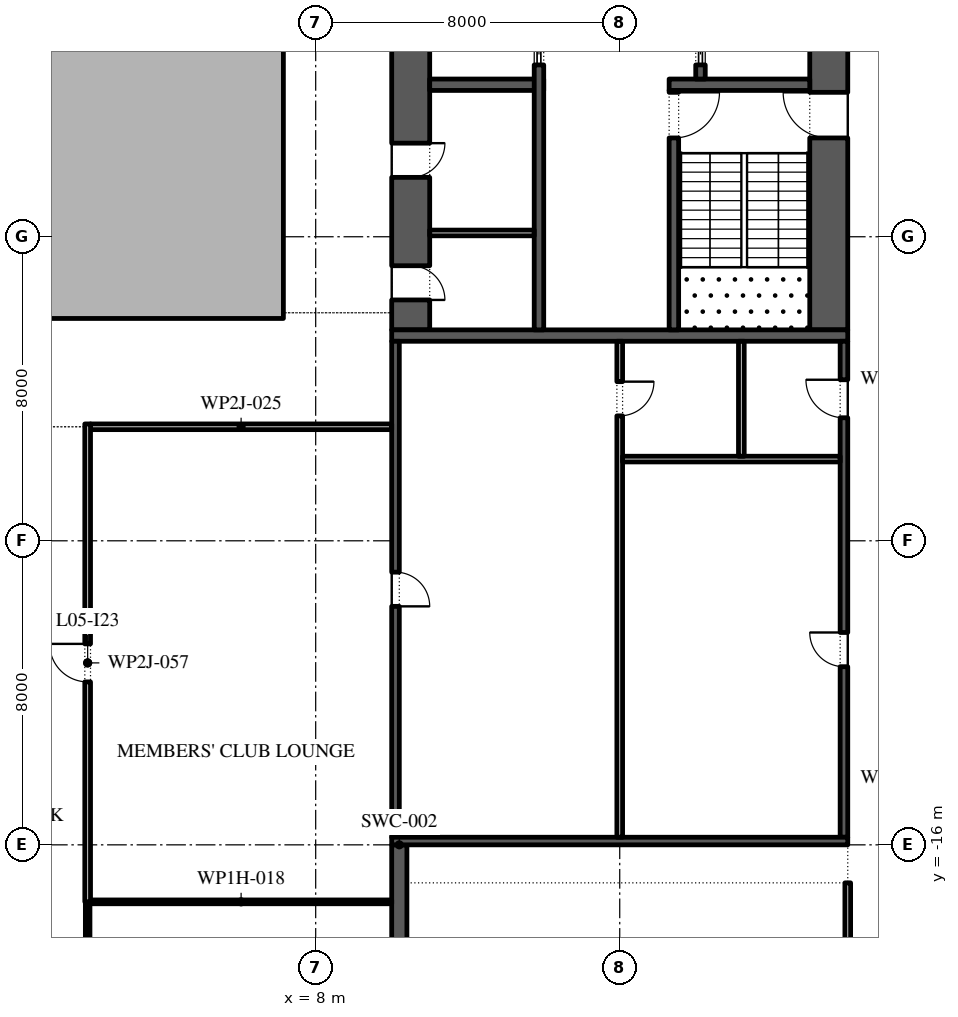
"""IFC4 building model, lengths in metres.
Left out: names, types, materials, properties, quantities, classifications, styles, units other than length and angle.
Written with IfcOpenShell. Run it as: python <this file> out.ifc"""

import sys

from ifc_helpers import new_model, si_unit, direction, frame, frame_2d, origin, place, context, subcontext, project, spatial, polyline, rectangle, outline, extrude, element, fill, save


model = new_model("IFC4")
c1 = context("Model", 3, precision=1e-05, world=origin(), true_north=direction((0.0, 1.0)))
c2 = subcontext(c1, "Body", "Model", "MODEL_VIEW")
j1 = project(units=[si_unit("LENGTHUNIT", "METRE"), si_unit("PLANEANGLEUNIT", "RADIAN")], contexts=[c1])
p1 = place(None, origin())
s1 = spatial("IfcSite", under=j1, at=p1, CompositionType="ELEMENT")
p2 = place(p1, origin())
s2 = spatial("IfcBuilding", under=s1, at=p2, CompositionType="ELEMENT")
p3 = place(p2, frame((0.0, 0.0, 28.8)))
s3 = spatial("IfcBuildingStorey", under=s2, at=p3, CompositionType="ELEMENT", Elevation=28.8)
p4 = place(p3, frame((10.2, -31.0, 0.0), z_axis=(0.0, 0.0, 1.0), x_axis=(0.0, 1.0, 0.0)))
e1 = element("IfcWall", 1, at=p4, inside=s3, PredefinedType="SHEAR", context=c2, shape_type="SweptSolid", body=[
    extrude(rectangle(XDim=15.0, YDim=0.4, at=frame_2d((7.5, 0.0))), origin(), (0.0, 0.0, 1.0), 4.35),
])
p5 = place(p3, origin())
e2 = element("IfcWall", 2, at=p5, inside=s3, PredefinedType="STANDARD", context=c2, shape_type="SweptSolid", body=[
    extrude(outline(polyline([(-7.15, -2.15), (7.15, -2.15), (7.15, 16.15), (-7.15, 16.15), (-7.15, -2.15)]), holes=[polyline([(-7.0, -2.0), (-7.0, 16.0), (7.0, 16.0), (7.0, -2.0), (-7.0, -2.0)])]), origin(), (0.0, 0.0, 1.0), 4.35),
])
p6 = place(p3, frame((21.5, -2.45, 0.0), z_axis=(0.0, 0.0, 1.0), x_axis=(0.0, 1.0, 0.0)))
e3 = element("IfcWall", 3, at=p6, inside=s3, PredefinedType="SHEAR", context=c2, shape_type="SweptSolid", body=[
    extrude(rectangle(XDim=27.9, YDim=1.0, at=frame_2d((13.95, 0.0))), origin(), (0.0, 0.0, 1.0), 4.35),
])
p7 = place(p6, frame((5.05, 0.0, 0.0)))
e4 = element("IfcOpeningElement", 4, at=p7, cuts=e3, PredefinedType="OPENING", context=c2, shape_type="SweptSolid", body=[
    extrude(rectangle(XDim=1.2, YDim=2.1, at=frame_2d((0.6, 1.05))), frame((0.0, 0.51, 0.0), z_axis=(0.0, -1.0, 0.0), x_axis=(1.0, 0.0, 0.0)), (0.0, 0.0, 1.0), 1.02),
])
p8 = place(p6, frame((21.65, 0.0, 0.0)))
e5 = element("IfcOpeningElement", 5, at=p8, cuts=e3, PredefinedType="OPENING", context=c2, shape_type="SweptSolid", body=[
    extrude(rectangle(XDim=1.2, YDim=2.1, at=frame_2d((0.6, 1.05))), frame((0.0, 0.51, 0.0), z_axis=(0.0, -1.0, 0.0), x_axis=(1.0, 0.0, 0.0)), (0.0, 0.0, 1.0), 1.02),
])
p9 = place(p3, frame((10.5, -2.45, 0.0), z_axis=(0.0, 0.0, 1.0), x_axis=(0.0, 1.0, 0.0)))
e6 = element("IfcWall", 6, at=p9, inside=s3, PredefinedType="SHEAR", context=c2, shape_type="SweptSolid", body=[
    extrude(rectangle(XDim=27.9, YDim=1.0, at=frame_2d((13.95, 0.0))), origin(), (0.0, 0.0, 1.0), 4.35),
])
p10 = place(p9, frame((23.65, 0.0, 0.0)))
e7 = element("IfcOpeningElement", 7, at=p10, cuts=e6, PredefinedType="OPENING", context=c2, shape_type="SweptSolid", body=[
    extrude(rectangle(XDim=2.4, YDim=2.1, at=frame_2d((1.2, 1.05))), frame((0.0, 0.51, 0.0), z_axis=(0.0, -1.0, 0.0), x_axis=(1.0, 0.0, 0.0)), (0.0, 0.0, 1.0), 1.02),
])
p11 = place(p9, frame((0.788, 0.0, 0.0)))
e8 = element("IfcOpeningElement", 8, at=p11, cuts=e6, PredefinedType="OPENING", context=c2, shape_type="SweptSolid", body=[
    extrude(rectangle(XDim=0.9, YDim=2.1, at=frame_2d((0.45, 1.05))), frame((0.0, 0.51, 0.0), z_axis=(0.0, -1.0, 0.0), x_axis=(1.0, 0.0, 0.0)), (0.0, 0.0, 1.0), 1.02),
])
p12 = place(p9, frame((4.012, 0.0, 0.0)))
e9 = element("IfcOpeningElement", 9, at=p12, cuts=e6, PredefinedType="OPENING", context=c2, shape_type="SweptSolid", body=[
    extrude(rectangle(XDim=0.9, YDim=2.1, at=frame_2d((0.45, 1.05))), frame((0.0, 0.51, 0.0), z_axis=(0.0, -1.0, 0.0), x_axis=(1.0, 0.0, 0.0)), (0.0, 0.0, 1.0), 1.02),
])
p13 = place(p3, frame((10.0, -2.6, 0.0), z_axis=(0.0, 0.0, 1.0), x_axis=(1.0, 0.0, 0.0)))
e10 = element("IfcWall", 10, at=p13, inside=s3, PredefinedType="SHEAR", context=c2, shape_type="SweptSolid", body=[
    extrude(rectangle(XDim=12.0, YDim=0.3, at=frame_2d((6.0, 0.0))), origin(), (0.0, 0.0, 1.0), 4.35),
])
p14 = place(p3, frame((17.3, 4.0, 0.0), z_axis=(0.0, 0.0, 1.0), x_axis=(1.0, 0.0, 0.0)))
e11 = element("IfcWall", 11, at=p14, inside=s3, PredefinedType="SHEAR", context=c2, shape_type="SweptSolid", body=[
    extrude(rectangle(XDim=3.7, YDim=0.3, at=frame_2d((1.85, 0.0))), origin(), (0.0, 0.0, 1.0), 4.35),
])
p15 = place(p3, frame((17.425, -2.45, 0.0), z_axis=(0.0, 0.0, 1.0), x_axis=(0.0, 1.0, 0.0)))
e12 = element("IfcWall", 12, at=p15, inside=s3, PredefinedType="SHEAR", context=c2, shape_type="SweptSolid", body=[
    extrude(rectangle(XDim=6.3, YDim=0.25, at=frame_2d((3.15, 0.0))), origin(), (0.0, 0.0, 1.0), 4.35),
])
p16 = place(p15, frame((5.05, 0.0, 0.0)))
e13 = element("IfcOpeningElement", 13, at=p16, cuts=e12, PredefinedType="OPENING", context=c2, shape_type="SweptSolid", body=[
    extrude(rectangle(XDim=1.2, YDim=2.1, at=frame_2d((0.6, 1.05))), frame((0.0, 0.135, 0.0), z_axis=(0.0, -1.0, 0.0), x_axis=(1.0, 0.0, 0.0)), (0.0, 0.0, 1.0), 0.27),
])
p17 = place(p3, frame((18.125, 4.15, 0.0), z_axis=(0.0, 0.0, 1.0), x_axis=(0.0, 1.0, 0.0)))
e14 = element("IfcWall", 14, at=p17, inside=s3, PredefinedType="SHEAR", context=c2, shape_type="SweptSolid", body=[
    extrude(rectangle(XDim=14.7, YDim=0.25, at=frame_2d((7.35, 0.0))), origin(), (0.0, 0.0, 1.0), 4.35),
])
p18 = place(p17, frame((0.371, 0.0, 0.0)))
e15 = element("IfcOpeningElement", 15, at=p18, cuts=e14, PredefinedType="OPENING", context=c2, shape_type="SweptSolid", body=[
    extrude(rectangle(XDim=1.1, YDim=2.1, at=frame_2d((0.55, 1.05))), frame((0.0, 0.135, 0.0), z_axis=(0.0, -1.0, 0.0), x_axis=(1.0, 0.0, 0.0)), (0.0, 0.0, 1.0), 0.27),
])
p19 = place(p17, frame((2.514, 0.0, 0.0)))
e16 = element("IfcOpeningElement", 16, at=p19, cuts=e14, PredefinedType="OPENING", context=c2, shape_type="SweptSolid", body=[
    extrude(rectangle(XDim=1.1, YDim=2.1, at=frame_2d((0.55, 1.05))), frame((0.0, 0.135, 0.0), z_axis=(0.0, -1.0, 0.0), x_axis=(1.0, 0.0, 0.0)), (0.0, 0.0, 1.0), 0.27),
])
p20 = place(p17, frame((4.657, 0.0, 0.0)))
e17 = element("IfcOpeningElement", 17, at=p20, cuts=e14, PredefinedType="OPENING", context=c2, shape_type="SweptSolid", body=[
    extrude(rectangle(XDim=1.1, YDim=2.1, at=frame_2d((0.55, 1.05))), frame((0.0, 0.135, 0.0), z_axis=(0.0, -1.0, 0.0), x_axis=(1.0, 0.0, 0.0)), (0.0, 0.0, 1.0), 0.27),
])
p21 = place(p17, frame((6.8, 0.0, 0.0)))
e18 = element("IfcOpeningElement", 18, at=p21, cuts=e14, PredefinedType="OPENING", context=c2, shape_type="SweptSolid", body=[
    extrude(rectangle(XDim=1.1, YDim=2.1, at=frame_2d((0.55, 1.05))), frame((0.0, 0.135, 0.0), z_axis=(0.0, -1.0, 0.0), x_axis=(1.0, 0.0, 0.0)), (0.0, 0.0, 1.0), 0.27),
])
p22 = place(p17, frame((8.943, 0.0, 0.0)))
e19 = element("IfcOpeningElement", 19, at=p22, cuts=e14, PredefinedType="OPENING", context=c2, shape_type="SweptSolid", body=[
    extrude(rectangle(XDim=1.1, YDim=2.1, at=frame_2d((0.55, 1.05))), frame((0.0, 0.135, 0.0), z_axis=(0.0, -1.0, 0.0), x_axis=(1.0, 0.0, 0.0)), (0.0, 0.0, 1.0), 0.27),
])
p23 = place(p17, frame((11.086, 0.0, 0.0)))
e20 = element("IfcOpeningElement", 20, at=p23, cuts=e14, PredefinedType="OPENING", context=c2, shape_type="SweptSolid", body=[
    extrude(rectangle(XDim=1.1, YDim=2.1, at=frame_2d((0.55, 1.05))), frame((0.0, 0.135, 0.0), z_axis=(0.0, -1.0, 0.0), x_axis=(1.0, 0.0, 0.0)), (0.0, 0.0, 1.0), 0.27),
])
p24 = place(p17, frame((13.229, 0.0, 0.0)))
e21 = element("IfcOpeningElement", 21, at=p24, cuts=e14, PredefinedType="OPENING", context=c2, shape_type="SweptSolid", body=[
    extrude(rectangle(XDim=1.1, YDim=2.1, at=frame_2d((0.55, 1.05))), frame((0.0, 0.135, 0.0), z_axis=(0.0, -1.0, 0.0), x_axis=(1.0, 0.0, 0.0)), (0.0, 0.0, 1.0), 0.27),
])
p25 = place(p3, frame((11.0, 4.0, 0.0), z_axis=(0.0, 0.0, 1.0), x_axis=(1.0, 0.0, 0.0)))
e22 = element("IfcWall", 22, at=p25, inside=s3, PredefinedType="SHEAR", context=c2, shape_type="SweptSolid", body=[
    extrude(rectangle(XDim=3.0, YDim=0.3, at=frame_2d((1.5, 0.0))), origin(), (0.0, 0.0, 1.0), 4.35),
])
p26 = place(p3, frame((13.875, -2.45, 0.0), z_axis=(0.0, 0.0, 1.0), x_axis=(0.0, 1.0, 0.0)))
e23 = element("IfcWall", 23, at=p26, inside=s3, PredefinedType="SHEAR", context=c2, shape_type="SweptSolid", body=[
    extrude(rectangle(XDim=21.3, YDim=0.25, at=frame_2d((10.65, 0.0))), origin(), (0.0, 0.0, 1.0), 4.35),
])
p27 = place(p26, frame((10.396, 0.0, 0.0)))
e24 = element("IfcOpeningElement", 24, at=p27, cuts=e23, PredefinedType="OPENING", context=c2, shape_type="SweptSolid", body=[
    extrude(rectangle(XDim=0.9, YDim=2.1, at=frame_2d((0.45, 1.05))), frame((0.0, 0.135, 0.0), z_axis=(0.0, -1.0, 0.0), x_axis=(1.0, 0.0, 0.0)), (0.0, 0.0, 1.0), 0.27),
])
p28 = place(p26, frame((14.6, 0.0, 0.0)))
e25 = element("IfcOpeningElement", 25, at=p28, cuts=e23, PredefinedType="OPENING", context=c2, shape_type="SweptSolid", body=[
    extrude(rectangle(XDim=0.9, YDim=2.1, at=frame_2d((0.45, 1.05))), frame((0.0, 0.135, 0.0), z_axis=(0.0, -1.0, 0.0), x_axis=(1.0, 0.0, 0.0)), (0.0, 0.0, 1.0), 0.27),
])
p29 = place(p26, frame((18.775, 0.0, 0.0)))
e26 = element("IfcOpeningElement", 26, at=p29, cuts=e23, PredefinedType="OPENING", context=c2, shape_type="SweptSolid", body=[
    extrude(rectangle(XDim=0.9, YDim=2.1, at=frame_2d((0.45, 1.05))), frame((0.0, 0.135, 0.0), z_axis=(0.0, -1.0, 0.0), x_axis=(1.0, 0.0, 0.0)), (0.0, 0.0, 1.0), 0.27),
])
p30 = place(p26, frame((6.971, 0.0, 0.0)))
e27 = element("IfcOpeningElement", 27, at=p30, cuts=e23, PredefinedType="OPENING", context=c2, shape_type="SweptSolid", body=[
    extrude(rectangle(XDim=1.1, YDim=2.1, at=frame_2d((0.55, 1.05))), frame((0.0, 0.135, 0.0), z_axis=(0.0, -1.0, 0.0), x_axis=(1.0, 0.0, 0.0)), (0.0, 0.0, 1.0), 0.27),
])
p31 = place(p3, frame((11.0, 0.1, 0.0), z_axis=(0.0, 0.0, 1.0), x_axis=(1.0, 0.0, 0.0)))
e28 = element("IfcWall", 28, at=p31, inside=s3, PredefinedType="PARTITIONING", context=c2, shape_type="SweptSolid", body=[
    extrude(rectangle(XDim=2.75, YDim=0.15, at=frame_2d((1.375, 0.0))), origin(), (0.0, 0.0, 1.0), 4.35),
])
p32 = place(p3, frame((21.9, -15.8, 0.0), z_axis=(0.0, 0.0, 1.0), x_axis=(0.0, 1.0, 0.0)))
e29 = element("IfcWall", 29, at=p32, inside=s3, PredefinedType="SHEAR", context=c2, shape_type="SweptSolid", body=[
    extrude(rectangle(XDim=13.05, YDim=0.2, at=frame_2d((6.525, 0.0))), origin(), (0.0, 0.0, 1.0), 4.35),
])
p33 = place(p32, frame((4.488, 0.0, 0.0)))
e30 = element("IfcOpeningElement", 30, at=p33, cuts=e29, PredefinedType="OPENING", context=c2, shape_type="SweptSolid", body=[
    extrude(rectangle(XDim=0.9, YDim=2.1, at=frame_2d((0.45, 1.05))), frame((0.0, 0.11, 0.0), z_axis=(0.0, -1.0, 0.0), x_axis=(1.0, 0.0, 0.0)), (0.0, 0.0, 1.0), 0.22),
])
p34 = place(p32, frame((11.038, 0.0, 0.0)))
e31 = element("IfcOpeningElement", 31, at=p34, cuts=e29, PredefinedType="OPENING", context=c2, shape_type="SweptSolid", body=[
    extrude(rectangle(XDim=1.0, YDim=2.1, at=frame_2d((0.5, 1.05))), frame((0.0, 0.11, 0.0), z_axis=(0.0, -1.0, 0.0), x_axis=(1.0, 0.0, 0.0)), (0.0, 0.0, 1.0), 0.22),
])
p35 = place(p3, frame((10.1, -15.8, 0.0), z_axis=(0.0, 0.0, 1.0), x_axis=(0.0, 1.0, 0.0)))
e32 = element("IfcWall", 32, at=p35, inside=s3, PredefinedType="SHEAR", context=c2, shape_type="SweptSolid", body=[
    extrude(rectangle(XDim=13.05, YDim=0.2, at=frame_2d((6.525, 0.0))), origin(), (0.0, 0.0, 1.0), 4.35),
])
p36 = place(p35, frame((6.075, 0.0, 0.0)))
e33 = element("IfcOpeningElement", 33, at=p36, cuts=e32, PredefinedType="OPENING", context=c2, shape_type="SweptSolid", body=[
    extrude(rectangle(XDim=0.9, YDim=2.1, at=frame_2d((0.45, 1.05))), frame((0.0, 0.11, 0.0), z_axis=(0.0, -1.0, 0.0), x_axis=(1.0, 0.0, 0.0)), (0.0, 0.0, 1.0), 0.22),
])
p37 = place(p3, frame((10.0, -15.9, 0.0), z_axis=(0.0, 0.0, 1.0), x_axis=(1.0, 0.0, 0.0)))
e34 = element("IfcWall", 34, at=p37, inside=s3, PredefinedType="SHEAR", context=c2, shape_type="SweptSolid", body=[
    extrude(rectangle(XDim=12.0, YDim=0.2, at=frame_2d((6.0, 0.0))), origin(), (0.0, 0.0, 1.0), 4.35),
])
p38 = place(p3, frame((16.0, -15.8, 0.0), z_axis=(0.0, 0.0, 1.0), x_axis=(0.0, 1.0, 0.0)))
e35 = element("IfcWall", 35, at=p38, inside=s3, PredefinedType="PARTITIONING", context=c2, shape_type="SweptSolid", body=[
    extrude(rectangle(XDim=13.05, YDim=0.15, at=frame_2d((6.525, 0.0))), origin(), (0.0, 0.0, 1.0), 4.35),
])
p39 = place(p38, frame((11.087, 0.0, 0.0)))
e36 = element("IfcOpeningElement", 36, at=p39, cuts=e35, PredefinedType="OPENING", context=c2, shape_type="SweptSolid", body=[
    extrude(rectangle(XDim=0.9, YDim=2.1, at=frame_2d((0.45, 1.05))), frame((0.0, 0.085, 0.0), z_axis=(0.0, -1.0, 0.0), x_axis=(1.0, 0.0, 0.0)), (0.0, 0.0, 1.0), 0.17),
])
p40 = place(p3, frame((16.075, -5.85, 0.0), z_axis=(0.0, 0.0, 1.0), x_axis=(1.0, 0.0, 0.0)))
e37 = element("IfcWall", 37, at=p40, inside=s3, PredefinedType="PARTITIONING", context=c2, shape_type="SweptSolid", body=[
    extrude(rectangle(XDim=5.725, YDim=0.15, at=frame_2d((2.863, 0.0))), origin(), (0.0, 0.0, 1.0), 4.35),
])
p41 = place(p3, frame((19.2, -5.775, 0.0), z_axis=(0.0, 0.0, 1.0), x_axis=(0.0, 1.0, 0.0)))
e38 = element("IfcWall", 38, at=p41, inside=s3, PredefinedType="PARTITIONING", context=c2, shape_type="SweptSolid", body=[
    extrude(rectangle(XDim=3.025, YDim=0.15, at=frame_2d((1.512, 0.0))), origin(), (0.0, 0.0, 1.0), 4.35),
])
p42 = place(p3, frame((2.075, -17.5, 0.0), z_axis=(0.0, 0.0, 1.0), x_axis=(1.0, 0.0, 0.0)))
e39 = element("IfcWall", 39, at=p42, inside=s3, PredefinedType="PARTITIONING", context=c2, shape_type="SweptSolid", body=[
    extrude(rectangle(XDim=7.925, YDim=0.1, at=frame_2d((3.962, 0.0))), origin(), (0.0, 0.0, 1.0), 4.35),
])
p43 = place(p3, frame((2.075, -5.0, 0.0), z_axis=(0.0, 0.0, 1.0), x_axis=(1.0, 0.0, 0.0)))
e40 = element("IfcWall", 40, at=p43, inside=s3, PredefinedType="PARTITIONING", context=c2, shape_type="SweptSolid", body=[
    extrude(rectangle(XDim=7.925, YDim=0.15, at=frame_2d((3.962, 0.0))), origin(), (0.0, 0.0, 1.0), 4.35),
])
p44 = place(p3, frame((2.0, -28.56, 0.0), z_axis=(0.0, 0.0, 1.0), x_axis=(0.0, 1.0, 0.0)))
e41 = element("IfcWall", 41, at=p44, inside=s3, PredefinedType="PARTITIONING", context=c2, shape_type="SweptSolid", body=[
    extrude(rectangle(XDim=11.06, YDim=0.12, at=frame_2d((5.53, 0.0))), origin(), (0.0, 0.0, 1.0), 4.35),
])
p45 = place(p44, frame((5.03, 0.0, 0.0)))
e42 = element("IfcOpeningElement", 42, at=p45, cuts=e41, PredefinedType="OPENING", context=c2, shape_type="SweptSolid", body=[
    extrude(rectangle(XDim=1.0, YDim=2.1, at=frame_2d((0.5, 1.05))), frame((0.0, 0.07, 0.0), z_axis=(0.0, -1.0, 0.0), x_axis=(1.0, 0.0, 0.0)), (0.0, 0.0, 1.0), 0.14),
])
p46 = place(p3, frame((2.0, -17.5, 0.0), z_axis=(0.0, 0.0, 1.0), x_axis=(0.0, 1.0, 0.0)))
e43 = element("IfcWall", 43, at=p46, inside=s3, PredefinedType="PARTITIONING", context=c2, shape_type="SweptSolid", body=[
    extrude(rectangle(XDim=12.575, YDim=0.15, at=frame_2d((6.288, 0.0))), origin(), (0.0, 0.0, 1.0), 4.35),
])
p47 = place(p46, frame((5.788, 0.0, 0.0)))
e44 = element("IfcOpeningElement", 44, at=p47, cuts=e43, PredefinedType="OPENING", context=c2, shape_type="SweptSolid", body=[
    extrude(rectangle(XDim=1.0, YDim=2.1, at=frame_2d((0.5, 1.05))), frame((0.0, 0.085, 0.0), z_axis=(0.0, -1.0, 0.0), x_axis=(1.0, 0.0, 0.0)), (0.0, 0.0, 1.0), 0.17),
])
p48 = place(p3, frame((22.0, -28.575, 0.0), z_axis=(0.0, 0.0, 1.0), x_axis=(0.0, 1.0, 0.0)))
e45 = element("IfcWall", 45, at=p48, inside=s3, PredefinedType="PARTITIONING", context=c2, shape_type="SweptSolid", body=[
    extrude(rectangle(XDim=11.575, YDim=0.15, at=frame_2d((5.788, 0.0))), origin(), (0.0, 0.0, 1.0), 4.35),
])
p49 = place(p48, frame((5.288, 0.0, 0.0)))
e46 = element("IfcOpeningElement", 46, at=p49, cuts=e45, PredefinedType="OPENING", context=c2, shape_type="SweptSolid", body=[
    extrude(rectangle(XDim=1.0, YDim=2.1, at=frame_2d((0.5, 1.05))), frame((0.0, 0.085, 0.0), z_axis=(0.0, -1.0, 0.0), x_axis=(1.0, 0.0, 0.0)), (0.0, 0.0, 1.0), 0.17),
])
p50 = place(p18, origin())
e47 = element("IfcDoor", 47, at=p50, inside=s3, OperationType="SLIDING_TO_LEFT", PredefinedType="DOOR", context=c2, shape_type="SweptSolid", body=[
    extrude(rectangle(XDim=1.1, YDim=2.1, at=frame_2d((0.55, 1.05))), frame((0.0, 0.025, 0.0), z_axis=(0.0, -1.0, 0.0), x_axis=(1.0, 0.0, 0.0)), (0.0, 0.0, 1.0), 0.05),
])
fill(e15, e47)
p51 = place(p30, origin())
e48 = element("IfcDoor", 48, at=p51, inside=s3, OperationType="SLIDING_TO_LEFT", PredefinedType="DOOR", context=c2, shape_type="SweptSolid", body=[
    extrude(rectangle(XDim=1.1, YDim=2.1, at=frame_2d((0.55, 1.05))), frame((0.0, 0.025, 0.0), z_axis=(0.0, -1.0, 0.0), x_axis=(1.0, 0.0, 0.0)), (0.0, 0.0, 1.0), 0.05),
])
fill(e27, e48)
p52 = place(p16, frame((1.2, 0.0, 0.0), z_axis=(0.0, 0.0, 1.0), x_axis=(-1.0, 0.0, 0.0)))
e49 = element("IfcDoor", 49, at=p52, inside=s3, OperationType="SINGLE_SWING_RIGHT", PredefinedType="DOOR", context=c2, shape_type="SweptSolid", body=[
    extrude(rectangle(XDim=1.2, YDim=2.1, at=frame_2d((0.6, 1.05))), frame((0.0, 0.025, 0.0), z_axis=(0.0, -1.0, 0.0), x_axis=(1.0, 0.0, 0.0)), (0.0, 0.0, 1.0), 0.05),
])
fill(e13, e49)
p53 = place(p7, origin())
e50 = element("IfcDoor", 50, at=p53, inside=s3, OperationType="SINGLE_SWING_LEFT", PredefinedType="DOOR", context=c2, shape_type="SweptSolid", body=[
    extrude(rectangle(XDim=1.2, YDim=2.1, at=frame_2d((0.6, 1.05))), frame((0.0, 0.025, 0.0), z_axis=(0.0, -1.0, 0.0), x_axis=(1.0, 0.0, 0.0)), (0.0, 0.0, 1.0), 0.05),
])
fill(e4, e50)
p54 = place(p11, frame((0.9, -0.95, 0.0), z_axis=(0.0, 0.0, 1.0), x_axis=(-1.0, 0.0, 0.0)))
e51 = element("IfcDoor", 51, at=p54, inside=s3, OperationType="SINGLE_SWING_LEFT", PredefinedType="DOOR", context=c2, shape_type="SweptSolid", body=[
    extrude(rectangle(XDim=0.9, YDim=2.1, at=frame_2d((0.45, 1.05))), frame((0.0, -0.45, 0.0), z_axis=(0.0, -1.0, 0.0), x_axis=(1.0, 0.0, 0.0)), (0.0, 0.0, 1.0), 0.05),
])
fill(e8, e51)
p55 = place(p12, frame((0.9, -0.95, 0.0), z_axis=(0.0, 0.0, 1.0), x_axis=(-1.0, 0.0, 0.0)))
e52 = element("IfcDoor", 52, at=p55, inside=s3, OperationType="SINGLE_SWING_RIGHT", PredefinedType="DOOR", context=c2, shape_type="SweptSolid", body=[
    extrude(rectangle(XDim=0.9, YDim=2.1, at=frame_2d((0.45, 1.05))), frame((0.0, -0.45, 0.0), z_axis=(0.0, -1.0, 0.0), x_axis=(1.0, 0.0, 0.0)), (0.0, 0.0, 1.0), 0.05),
])
fill(e9, e52)
p56 = place(p33, origin())
e53 = element("IfcDoor", 53, at=p56, inside=s3, OperationType="SINGLE_SWING_LEFT", PredefinedType="DOOR", context=c2, shape_type="SweptSolid", body=[
    extrude(rectangle(XDim=0.9, YDim=2.1, at=frame_2d((0.45, 1.05))), frame((0.0, 0.1, 0.0), z_axis=(0.0, -1.0, 0.0), x_axis=(1.0, 0.0, 0.0)), (0.0, 0.0, 1.0), 0.05),
])
fill(e30, e53)
p57 = place(p34, origin())
e54 = element("IfcDoor", 54, at=p57, inside=s3, OperationType="SINGLE_SWING_LEFT", PredefinedType="DOOR", context=c2, shape_type="SweptSolid", body=[
    extrude(rectangle(XDim=1.0, YDim=2.1, at=frame_2d((0.5, 1.05))), frame((0.0, 0.1, 0.0), z_axis=(0.0, -1.0, 0.0), x_axis=(1.0, 0.0, 0.0)), (0.0, 0.0, 1.0), 0.05),
])
fill(e31, e54)
p58 = place(p39, frame((0.9, 0.0, 0.0), z_axis=(0.0, 0.0, 1.0), x_axis=(-1.0, 0.0, 0.0)))
e55 = element("IfcDoor", 55, at=p58, inside=s3, OperationType="SINGLE_SWING_RIGHT", PredefinedType="DOOR", context=c2, shape_type="SweptSolid", body=[
    extrude(rectangle(XDim=0.9, YDim=2.1, at=frame_2d((0.45, 1.05))), frame((0.0, 0.025, 0.0), z_axis=(0.0, -1.0, 0.0), x_axis=(1.0, 0.0, 0.0)), (0.0, 0.0, 1.0), 0.05),
])
fill(e36, e55)
p59 = place(p36, frame((0.9, -0.15, 0.0), z_axis=(0.0, 0.0, 1.0), x_axis=(-1.0, 0.0, 0.0)))
e56 = element("IfcDoor", 56, at=p59, inside=s3, OperationType="SINGLE_SWING_LEFT", PredefinedType="DOOR", context=c2, shape_type="SweptSolid", body=[
    extrude(rectangle(XDim=0.9, YDim=2.1, at=frame_2d((0.45, 1.05))), frame((0.0, -0.05, 0.0), z_axis=(0.0, -1.0, 0.0), x_axis=(1.0, 0.0, 0.0)), (0.0, 0.0, 1.0), 0.05),
])
fill(e33, e56)
p60 = place(p47, origin())
e57 = element("IfcDoor", 57, at=p60, inside=s3, OperationType="SINGLE_SWING_LEFT", PredefinedType="DOOR", context=c2, shape_type="SweptSolid", body=[
    extrude(rectangle(XDim=1.0, YDim=2.1, at=frame_2d((0.5, 1.05))), frame((0.0, 0.025, 0.0), z_axis=(0.0, -1.0, 0.0), x_axis=(1.0, 0.0, 0.0)), (0.0, 0.0, 1.0), 0.05),
])
fill(e44, e57)
save(model, sys.argv[1])
